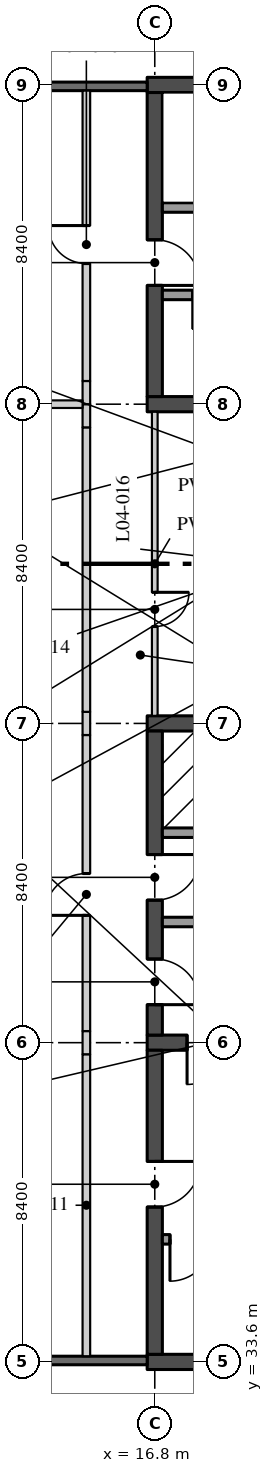
"""IFC4 building model, lengths in metres.
Left out: names, types, materials, properties, quantities, classifications, styles, units other than length and angle.
Written with IfcOpenShell. Run it as: python <this file> out.ifc"""

import sys

from ifc_helpers import new_model, si_unit, direction, frame, frame_2d, origin, place, context, subcontext, project, spatial, rectangle, extrude, element, fill, save


model = new_model("IFC4")
c1 = context("Model", 3, precision=1e-05, world=origin(), true_north=direction((0.0, 1.0)))
c2 = subcontext(c1, "Body", "Model", "MODEL_VIEW")
j1 = project(units=[si_unit("LENGTHUNIT", "METRE"), si_unit("PLANEANGLEUNIT", "RADIAN")], contexts=[c1])
p1 = place(None, origin())
s1 = spatial("IfcSite", under=j1, at=p1, CompositionType="ELEMENT")
p2 = place(p1, origin())
s2 = spatial("IfcBuilding", under=s1, at=p2, CompositionType="ELEMENT")
p3 = place(p2, frame((0.0, 0.0, 18.9)))
s3 = spatial("IfcBuildingStorey", under=s2, at=p3, CompositionType="ELEMENT", Elevation=18.9)
p4 = place(p3, frame((16.6, 42.0, 0.0), z_axis=(0.0, 0.0, 1.0), x_axis=(1.0, 0.0, 0.0)))
e1 = element("IfcWall", 1, at=p4, inside=s3, PredefinedType="SHEAR", context=c2, shape_type="SweptSolid", body=[
    extrude(rectangle(XDim=8.8, YDim=0.4, at=frame_2d((4.4, 0.0))), origin(), (0.0, 0.0, 1.0), 4.37),
])
p5 = place(p4, frame((1.05, 0.0, 0.0)))
e2 = element("IfcOpeningElement", 2, at=p5, cuts=e1, PredefinedType="OPENING", context=c2, shape_type="SweptSolid", body=[
    extrude(rectangle(XDim=1.1, YDim=2.1, at=frame_2d((0.55, 1.05))), frame((0.0, 0.21, 0.0), z_axis=(0.0, -1.0, 0.0), x_axis=(1.0, 0.0, 0.0)), (0.0, 0.0, 1.0), 0.42),
])
p6 = place(p3, frame((16.6, 50.4, 0.0), z_axis=(0.0, 0.0, 1.0), x_axis=(1.0, 0.0, 0.0)))
e3 = element("IfcWall", 3, at=p6, inside=s3, PredefinedType="SHEAR", context=c2, shape_type="SweptSolid", body=[
    extrude(rectangle(XDim=8.8, YDim=0.4, at=frame_2d((4.4, 0.0))), origin(), (0.0, 0.0, 1.0), 4.37),
])
p7 = place(p3, frame((16.8, 42.2, 0.0), z_axis=(0.0, 0.0, 1.0), x_axis=(0.0, 1.0, 0.0)))
e4 = element("IfcWall", 4, at=p7, inside=s3, PredefinedType="SHEAR", context=c2, shape_type="SweptSolid", body=[
    extrude(rectangle(XDim=8.0, YDim=0.4, at=frame_2d((4.0, 0.0))), origin(), (0.0, 0.0, 1.0), 4.37),
])
p8 = place(p7, frame((3.55, 0.0, 0.0)))
e5 = element("IfcOpeningElement", 5, at=p8, cuts=e4, PredefinedType="OPENING", context=c2, shape_type="SweptSolid", body=[
    extrude(rectangle(XDim=1.2, YDim=2.1, at=frame_2d((0.6, 1.05))), frame((0.0, 0.21, 0.0), z_axis=(0.0, -1.0, 0.0), x_axis=(1.0, 0.0, 0.0)), (0.0, 0.0, 1.0), 0.42),
])
p9 = place(p7, frame((0.8, 0.0, 0.0)))
e6 = element("IfcOpeningElement", 6, at=p9, cuts=e4, PredefinedType="OPENING", context=c2, shape_type="SweptSolid", body=[
    extrude(rectangle(XDim=1.2, YDim=2.1, at=frame_2d((0.6, 1.05))), frame((0.0, 0.21, 0.0), z_axis=(0.0, -1.0, 0.0), x_axis=(1.0, 0.0, 0.0)), (0.0, 0.0, 1.0), 0.42),
])
p10 = place(p3, frame((21.7, 47.525, 0.0), z_axis=(0.0, 0.0, 1.0), x_axis=(-1.0, 0.0, 0.0)))
e7 = element("IfcWall", 7, at=p10, inside=s3, PredefinedType="SOLIDWALL", context=c2, shape_type="SweptSolid", body=[
    extrude(rectangle(XDim=4.7, YDim=0.25, at=frame_2d((2.35, 0.0))), origin(), (0.0, 0.0, 1.0), 4.37),
])
p11 = place(p10, frame((1.9, 0.0, 0.0)))
e8 = element("IfcOpeningElement", 8, at=p11, cuts=e7, PredefinedType="OPENING", context=c2, shape_type="SweptSolid", body=[
    extrude(rectangle(XDim=0.9, YDim=2.1, at=frame_2d((0.45, 1.05))), frame((0.0, 0.135, 0.0), z_axis=(0.0, -1.0, 0.0), x_axis=(1.0, 0.0, 0.0)), (0.0, 0.0, 1.0), 0.27),
])
p12 = place(p3, frame((19.65, 45.175, 0.0), z_axis=(0.0, 0.0, 1.0), x_axis=(-1.0, 0.0, 0.0)))
e9 = element("IfcWall", 9, at=p12, inside=s3, PredefinedType="SOLIDWALL", context=c2, shape_type="SweptSolid", body=[
    extrude(rectangle(XDim=2.65, YDim=0.25, at=frame_2d((1.325, 0.0))), origin(), (0.0, 0.0, 1.0), 4.37),
])
for number, where, z_axis, x_axis in (
    (10, (16.6, 58.8, 0.0), (0.0, 0.0, 1.0), (1.0, 0.0, 0.0)),
    (11, (16.6, 67.2, 0.0), (0.0, 0.0, 1.0), (1.0, 0.0, 0.0)),
):
    element("IfcWall", number, at=place(p3, frame(where, z_axis=z_axis, x_axis=x_axis)), inside=s3, PredefinedType="SHEAR", context=c2, shape_type="SweptSolid", body=[
        extrude(rectangle(XDim=8.8, YDim=0.4, at=frame_2d((4.4, 0.0))), origin(), (0.0, 0.0, 1.0), 4.37),
    ])
p13 = place(p3, frame((16.8, 59.0, 0.0), z_axis=(0.0, 0.0, 1.0), x_axis=(0.0, 1.0, 0.0)))
e12 = element("IfcWall", 12, at=p13, inside=s3, PredefinedType="SHEAR", context=c2, shape_type="SweptSolid", body=[
    extrude(rectangle(XDim=8.0, YDim=0.4, at=frame_2d((4.0, 0.0))), origin(), (0.0, 0.0, 1.0), 4.37),
])
p14 = place(p13, frame((2.925, 0.0, 0.0)))
e13 = element("IfcOpeningElement", 13, at=p14, cuts=e12, PredefinedType="OPENING", context=c2, shape_type="SweptSolid", body=[
    extrude(rectangle(XDim=1.2, YDim=2.1, at=frame_2d((0.6, 1.05))), frame((0.0, 0.21, 0.0), z_axis=(0.0, -1.0, 0.0), x_axis=(1.0, 0.0, 0.0)), (0.0, 0.0, 1.0), 0.42),
])
p15 = place(p3, frame((25.0, 63.975, 0.0), z_axis=(0.0, 0.0, 1.0), x_axis=(-1.0, 0.0, 0.0)))
e14 = element("IfcWall", 14, at=p15, inside=s3, PredefinedType="SOLIDWALL", context=c2, shape_type="SweptSolid", body=[
    extrude(rectangle(XDim=8.0, YDim=0.25, at=frame_2d((4.0, 0.0))), origin(), (0.0, 0.0, 1.0), 4.37),
])
p16 = place(p15, frame((0.2, 0.0, 0.0)))
e15 = element("IfcOpeningElement", 15, at=p16, cuts=e14, PredefinedType="OPENING", context=c2, shape_type="SweptSolid", body=[
    extrude(rectangle(XDim=1.1, YDim=2.1, at=frame_2d((0.55, 1.05))), frame((0.0, 0.135, 0.0), z_axis=(0.0, -1.0, 0.0), x_axis=(1.0, 0.0, 0.0)), (0.0, 0.0, 1.0), 0.27),
])
p17 = place(p3, frame((22.35, 61.675, 0.0), z_axis=(0.0, 0.0, 1.0), x_axis=(-1.0, 0.0, 0.0)))
e16 = element("IfcWall", 16, at=p17, inside=s3, PredefinedType="SOLIDWALL", context=c2, shape_type="SweptSolid", body=[
    extrude(rectangle(XDim=5.35, YDim=0.25, at=frame_2d((2.675, 0.0))), origin(), (0.0, 0.0, 1.0), 4.37),
])
p18 = place(p17, frame((3.65, 0.0, 0.0)))
e17 = element("IfcOpeningElement", 17, at=p18, cuts=e16, PredefinedType="OPENING", context=c2, shape_type="SweptSolid", body=[
    extrude(rectangle(XDim=0.9, YDim=2.1, at=frame_2d((0.45, 1.05))), frame((0.0, 0.135, 0.0), z_axis=(0.0, -1.0, 0.0), x_axis=(1.0, 0.0, 0.0)), (0.0, 0.0, 1.0), 0.27),
])
p19 = place(p17, frame((0.9, 0.0, 0.0)))
e18 = element("IfcOpeningElement", 18, at=p19, cuts=e16, PredefinedType="OPENING", context=c2, shape_type="SweptSolid", body=[
    extrude(rectangle(XDim=0.8, YDim=2.1, at=frame_2d((0.4, 1.05))), frame((0.0, 0.135, 0.0), z_axis=(0.0, -1.0, 0.0), x_axis=(1.0, 0.0, 0.0)), (0.0, 0.0, 1.0), 0.27),
])
p20 = place(p3, frame((16.6, 33.6, 0.0), z_axis=(0.0, 0.0, 1.0), x_axis=(1.0, 0.0, 0.0)))
e19 = element("IfcWall", 19, at=p20, inside=s3, PredefinedType="SHEAR", context=c2, shape_type="SweptSolid", body=[
    extrude(rectangle(XDim=8.8, YDim=0.4, at=frame_2d((4.4, 0.0))), origin(), (0.0, 0.0, 1.0), 4.37),
])
p21 = place(p3, frame((16.8, 33.8, 0.0), z_axis=(0.0, 0.0, 1.0), x_axis=(0.0, 1.0, 0.0)))
e20 = element("IfcWall", 20, at=p21, inside=s3, PredefinedType="SHEAR", context=c2, shape_type="SweptSolid", body=[
    extrude(rectangle(XDim=8.0, YDim=0.4, at=frame_2d((4.0, 0.0))), origin(), (0.0, 0.0, 1.0), 4.37),
])
p22 = place(p21, frame((3.875, 0.0, 0.0)))
e21 = element("IfcOpeningElement", 21, at=p22, cuts=e20, PredefinedType="OPENING", context=c2, shape_type="SweptSolid", body=[
    extrude(rectangle(XDim=1.2, YDim=2.1, at=frame_2d((0.6, 1.05))), frame((0.0, 0.21, 0.0), z_axis=(0.0, -1.0, 0.0), x_axis=(1.0, 0.0, 0.0)), (0.0, 0.0, 1.0), 0.42),
])
p23 = place(p3, frame((17.0, 36.825, 0.0), z_axis=(0.0, 0.0, 1.0), x_axis=(1.0, 0.0, 0.0)))
e22 = element("IfcWall", 22, at=p23, inside=s3, PredefinedType="SOLIDWALL", context=c2, shape_type="SweptSolid", body=[
    extrude(rectangle(XDim=8.0, YDim=0.25, at=frame_2d((4.0, 0.0))), origin(), (0.0, 0.0, 1.0), 4.37),
])
p24 = place(p23, frame((0.2, 0.0, 0.0)))
e23 = element("IfcOpeningElement", 23, at=p24, cuts=e22, PredefinedType="OPENING", context=c2, shape_type="SweptSolid", body=[
    extrude(rectangle(XDim=1.1, YDim=2.1, at=frame_2d((0.55, 1.05))), frame((0.0, 0.135, 0.0), z_axis=(0.0, -1.0, 0.0), x_axis=(1.0, 0.0, 0.0)), (0.0, 0.0, 1.0), 0.27),
])
p25 = place(p3, frame((16.8, 50.6, 0.0), z_axis=(0.0, 0.0, 1.0), x_axis=(0.0, 1.0, 0.0)))
e24 = element("IfcWall", 24, at=p25, inside=s3, PredefinedType="PARTITIONING", context=c2, shape_type="SweptSolid", body=[
    extrude(rectangle(XDim=8.0, YDim=0.15, at=frame_2d((4.0, 0.0))), origin(), (0.0, 0.0, 1.0), 3.746),
])
p26 = place(p25, frame((2.35, 0.0, 0.0)))
e25 = element("IfcOpeningElement", 25, at=p26, cuts=e24, PredefinedType="OPENING", context=c2, shape_type="SweptSolid", body=[
    extrude(rectangle(XDim=0.9, YDim=2.1, at=frame_2d((0.45, 1.05))), frame((0.0, 0.085, 0.0), z_axis=(0.0, -1.0, 0.0), x_axis=(1.0, 0.0, 0.0)), (0.0, 0.0, 1.0), 0.17),
])
p27 = place(p3, frame((15.0, 33.75, 0.0), z_axis=(0.0, 0.0, 1.0), x_axis=(0.0, 1.0, 0.0)))
e26 = element("IfcWall", 26, at=p27, inside=s3, PredefinedType="PARTITIONING", context=c2, shape_type="SweptSolid", body=[
    extrude(rectangle(XDim=7.945, YDim=0.2, at=frame_2d((3.973, 0.0))), origin(), (0.0, 0.0, 1.0), 4.37),
])
p28 = place(p3, frame((15.0, 41.695, 0.0), z_axis=(0.0, 0.0, 1.0), x_axis=(0.0, 1.0, 0.0)))
e27 = element("IfcWall", 27, at=p28, inside=s3, PredefinedType="PARTITIONING", context=c2, shape_type="SweptSolid", body=[
    extrude(rectangle(XDim=0.61, YDim=0.2, at=frame_2d((0.305, 0.0))), origin(), (0.0, 0.0, 1.0), 3.746),
])
p29 = place(p3, frame((15.0, 42.305, 0.0), z_axis=(0.0, 0.0, 1.0), x_axis=(0.0, 1.0, 0.0)))
e28 = element("IfcWall", 28, at=p29, inside=s3, PredefinedType="PARTITIONING", context=c2, shape_type="SweptSolid", body=[
    extrude(rectangle(XDim=7.79, YDim=0.2, at=frame_2d((3.895, 0.0))), origin(), (0.0, 0.0, 1.0), 4.37),
])
p30 = place(p29, frame((3.045, 0.0, 0.0)))
e29 = element("IfcOpeningElement", 29, at=p30, cuts=e28, PredefinedType="OPENING", context=c2, shape_type="SweptSolid", body=[
    extrude(rectangle(XDim=1.1, YDim=2.1, at=frame_2d((0.55, 1.05))), frame((0.0, 0.11, 0.0), z_axis=(0.0, -1.0, 0.0), x_axis=(1.0, 0.0, 0.0)), (0.0, 0.0, 1.0), 0.22),
])
p31 = place(p3, frame((15.0, 50.095, 0.0), z_axis=(0.0, 0.0, 1.0), x_axis=(0.0, 1.0, 0.0)))
e30 = element("IfcWall", 30, at=p31, inside=s3, PredefinedType="PARTITIONING", context=c2, shape_type="SweptSolid", body=[
    extrude(rectangle(XDim=0.61, YDim=0.2, at=frame_2d((0.305, 0.0))), origin(), (0.0, 0.0, 1.0), 3.746),
])
p32 = place(p3, frame((15.0, 50.705, 0.0), z_axis=(0.0, 0.0, 1.0), x_axis=(0.0, 1.0, 0.0)))
e31 = element("IfcWall", 31, at=p32, inside=s3, PredefinedType="PARTITIONING", context=c2, shape_type="SweptSolid", body=[
    extrude(rectangle(XDim=7.485, YDim=0.2, at=frame_2d((3.742, 0.0))), origin(), (0.0, 0.0, 1.0), 4.37),
])
p33 = place(p3, frame((15.0, 58.19, 0.0), z_axis=(0.0, 0.0, 1.0), x_axis=(0.0, 1.0, 0.0)))
e32 = element("IfcWall", 32, at=p33, inside=s3, PredefinedType="PARTITIONING", context=c2, shape_type="SweptSolid", body=[
    extrude(rectangle(XDim=0.61, YDim=0.2, at=frame_2d((0.305, 0.0))), origin(), (0.0, 0.0, 1.0), 3.746),
])
p34 = place(p3, frame((15.0, 58.8, 0.0), z_axis=(0.0, 0.0, 1.0), x_axis=(0.0, 1.0, 0.0)))
e33 = element("IfcWall", 33, at=p34, inside=s3, PredefinedType="PARTITIONING", context=c2, shape_type="SweptSolid", body=[
    extrude(rectangle(XDim=0.61, YDim=0.2, at=frame_2d((0.305, 0.0))), origin(), (0.0, 0.0, 1.0), 3.746),
])
p35 = place(p3, frame((15.0, 59.41, 0.0), z_axis=(0.0, 0.0, 1.0), x_axis=(0.0, 1.0, 0.0)))
e34 = element("IfcWall", 34, at=p35, inside=s3, PredefinedType="PARTITIONING", context=c2, shape_type="SweptSolid", body=[
    extrude(rectangle(XDim=7.64, YDim=0.2, at=frame_2d((3.82, 0.0))), origin(), (0.0, 0.0, 1.0), 4.37),
])
p36 = place(p35, frame((3.09, 0.0, 0.0)))
e35 = element("IfcOpeningElement", 35, at=p36, cuts=e34, PredefinedType="OPENING", context=c2, shape_type="SweptSolid", body=[
    extrude(rectangle(XDim=1.0, YDim=2.1, at=frame_2d((0.5, 1.05))), frame((0.0, 0.11, 0.0), z_axis=(0.0, -1.0, 0.0), x_axis=(1.0, 0.0, 0.0)), (0.0, 0.0, 1.0), 0.22),
])
p37 = place(p3, frame((8.585, 58.8, 0.0), z_axis=(0.0, 0.0, 1.0), x_axis=(1.0, 0.0, 0.0)))
e36 = element("IfcWall", 36, at=p37, inside=s3, PredefinedType="PARTITIONING", context=c2, shape_type="SweptSolid", body=[
    extrude(rectangle(XDim=6.315, YDim=0.2, at=frame_2d((3.157, 0.0))), origin(), (0.0, 0.0, 1.0), 3.746),
])
p38 = place(p3, frame((8.406, 33.637, 0.0), z_axis=(0.0, 0.0, 1.0), x_axis=(1.0, 0.0, 0.0)))
e37 = element("IfcWall", 37, at=p38, inside=s3, PredefinedType="SOLIDWALL", context=c2, shape_type="SweptSolid", body=[
    extrude(rectangle(XDim=8.195, YDim=0.225, at=frame_2d((4.097, 0.0))), origin(), (0.0, 0.0, 1.0), 3.746),
])
p39 = place(p38, frame((1.594, 0.0, 0.0)))
e38 = element("IfcOpeningElement", 38, at=p39, cuts=e37, PredefinedType="OPENING", context=c2, shape_type="SweptSolid", body=[
    extrude(rectangle(XDim=1.0, YDim=2.4, at=frame_2d((0.5, 1.2))), frame((0.0, 0.123, 0.0), z_axis=(0.0, -1.0, 0.0), x_axis=(1.0, 0.0, 0.0)), (0.0, 0.0, 1.0), 0.245),
])
p40 = place(p3, frame((16.6, 67.163, 0.0), z_axis=(0.0, 0.0, 1.0), x_axis=(-1.0, 0.0, 0.0)))
e39 = element("IfcWall", 39, at=p40, inside=s3, PredefinedType="SOLIDWALL", context=c2, shape_type="SweptSolid", body=[
    extrude(rectangle(XDim=8.195, YDim=0.225, at=frame_2d((4.097, 0.0))), origin(), (0.0, 0.0, 1.0), 3.746),
])
p41 = place(p40, frame((5.2, 0.0, 1.5)))
e40 = element("IfcOpeningElement", 40, at=p41, cuts=e39, PredefinedType="OPENING", context=c2, shape_type="SweptSolid", body=[
    extrude(rectangle(XDim=1.8, YDim=0.6, at=frame_2d((0.9, 0.3))), frame((0.0, 0.123, 0.0), z_axis=(0.0, -1.0, 0.0), x_axis=(1.0, 0.0, 0.0)), (0.0, 0.0, 1.0), 0.245),
])
p42 = place(p8, frame((1.2, 0.0, 0.0), z_axis=(0.0, 0.0, 1.0), x_axis=(-1.0, 0.0, 0.0)))
e41 = element("IfcDoor", 41, at=p42, inside=s3, OperationType="SINGLE_SWING_RIGHT", PredefinedType="DOOR", context=c2, shape_type="SweptSolid", body=[
    extrude(rectangle(XDim=1.2, YDim=2.1, at=frame_2d((0.6, 1.05))), frame((0.0, 0.035, 0.0), z_axis=(0.0, -1.0, 0.0), x_axis=(1.0, 0.0, 0.0)), (0.0, 0.0, 1.0), 0.07),
])
fill(e5, e41)
p43 = place(p9, frame((1.2, 0.0, 0.0), z_axis=(0.0, 0.0, 1.0), x_axis=(-1.0, 0.0, 0.0)))
e42 = element("IfcDoor", 42, at=p43, inside=s3, OperationType="SINGLE_SWING_LEFT", PredefinedType="DOOR", context=c2, shape_type="SweptSolid", body=[
    extrude(rectangle(XDim=1.2, YDim=2.1, at=frame_2d((0.6, 1.05))), frame((0.0, 0.035, 0.0), z_axis=(0.0, -1.0, 0.0), x_axis=(1.0, 0.0, 0.0)), (0.0, 0.0, 1.0), 0.07),
])
fill(e6, e42)
p44 = place(p5, frame((1.1, 0.0, 0.0), z_axis=(0.0, 0.0, 1.0), x_axis=(-1.0, 0.0, 0.0)))
e43 = element("IfcDoor", 43, at=p44, inside=s3, OperationType="SINGLE_SWING_LEFT", PredefinedType="DOOR", context=c2, shape_type="SweptSolid", body=[
    extrude(rectangle(XDim=1.1, YDim=2.1, at=frame_2d((0.55, 1.05))), frame((0.0, 0.035, 0.0), z_axis=(0.0, -1.0, 0.0), x_axis=(1.0, 0.0, 0.0)), (0.0, 0.0, 1.0), 0.07),
])
fill(e2, e43)
p45 = place(p14, frame((1.2, 0.0, 0.0), z_axis=(0.0, 0.0, 1.0), x_axis=(-1.0, 0.0, 0.0)))
e44 = element("IfcDoor", 44, at=p45, inside=s3, OperationType="SINGLE_SWING_LEFT", PredefinedType="DOOR", context=c2, shape_type="SweptSolid", body=[
    extrude(rectangle(XDim=1.2, YDim=2.1, at=frame_2d((0.6, 1.05))), frame((0.0, 0.035, 0.0), z_axis=(0.0, -1.0, 0.0), x_axis=(1.0, 0.0, 0.0)), (0.0, 0.0, 1.0), 0.07),
])
fill(e13, e44)
p46 = place(p22, frame((1.2, 0.0, 0.0), z_axis=(0.0, 0.0, 1.0), x_axis=(-1.0, 0.0, 0.0)))
e45 = element("IfcDoor", 45, at=p46, inside=s3, OperationType="SINGLE_SWING_RIGHT", PredefinedType="DOOR", context=c2, shape_type="SweptSolid", body=[
    extrude(rectangle(XDim=1.2, YDim=2.1, at=frame_2d((0.6, 1.05))), frame((0.0, 0.035, 0.0), z_axis=(0.0, -1.0, 0.0), x_axis=(1.0, 0.0, 0.0)), (0.0, 0.0, 1.0), 0.07),
])
fill(e21, e45)
p47 = place(p24, frame((1.1, 0.0, 0.0), z_axis=(0.0, 0.0, 1.0), x_axis=(-1.0, 0.0, 0.0)))
e46 = element("IfcDoor", 46, at=p47, inside=s3, OperationType="SINGLE_SWING_LEFT", PredefinedType="DOOR", context=c2, shape_type="SweptSolid", body=[
    extrude(rectangle(XDim=1.1, YDim=2.1, at=frame_2d((0.55, 1.05))), frame((0.0, 0.035, 0.0), z_axis=(0.0, -1.0, 0.0), x_axis=(1.0, 0.0, 0.0)), (0.0, 0.0, 1.0), 0.07),
])
fill(e23, e46)
p48 = place(p26, frame((0.9, 0.0, 0.0), z_axis=(0.0, 0.0, 1.0), x_axis=(-1.0, 0.0, 0.0)))
e47 = element("IfcDoor", 47, at=p48, inside=s3, OperationType="SINGLE_SWING_RIGHT", PredefinedType="DOOR", context=c2, shape_type="SweptSolid", body=[
    extrude(rectangle(XDim=0.9, YDim=2.1, at=frame_2d((0.45, 1.05))), frame((0.0, 0.025, 0.0), z_axis=(0.0, -1.0, 0.0), x_axis=(1.0, 0.0, 0.0)), (0.0, 0.0, 1.0), 0.05),
])
fill(e25, e47)
p49 = place(p30, origin())
e48 = element("IfcDoor", 48, at=p49, inside=s3, OperationType="SINGLE_SWING_RIGHT", PredefinedType="DOOR", context=c2, shape_type="SweptSolid", body=[
    extrude(rectangle(XDim=1.1, YDim=2.1, at=frame_2d((0.55, 1.05))), frame((0.0, 0.025, 0.0), z_axis=(0.0, -1.0, 0.0), x_axis=(1.0, 0.0, 0.0)), (0.0, 0.0, 1.0), 0.05),
])
fill(e29, e48)
p50 = place(p36, origin())
e49 = element("IfcDoor", 49, at=p50, inside=s3, OperationType="SINGLE_SWING_LEFT", PredefinedType="DOOR", context=c2, shape_type="SweptSolid", body=[
    extrude(rectangle(XDim=1.0, YDim=2.1, at=frame_2d((0.5, 1.05))), frame((0.0, 0.025, 0.0), z_axis=(0.0, -1.0, 0.0), x_axis=(1.0, 0.0, 0.0)), (0.0, 0.0, 1.0), 0.05),
])
fill(e35, e49)
save(model, sys.argv[1])
